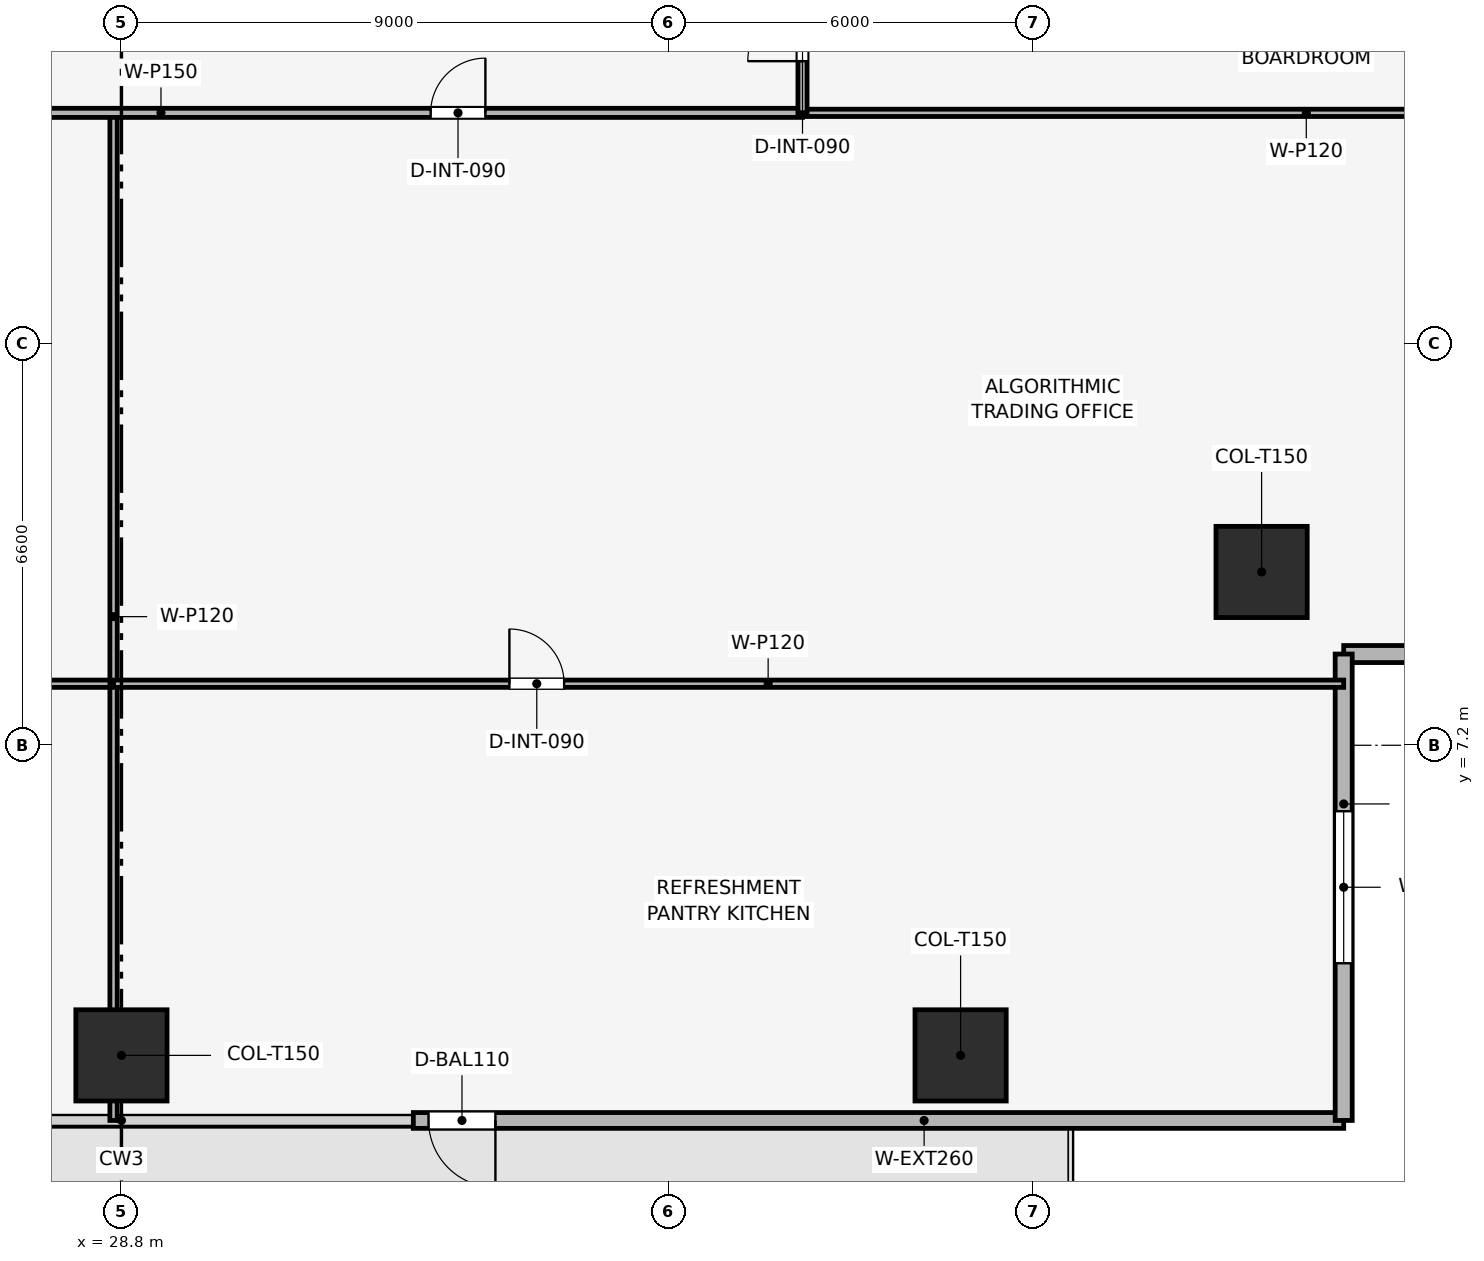
"""IFC4 building model, lengths in metres.
Left out: names, types, materials, properties, quantities, classifications, styles, units other than length and angle.
Written with IfcOpenShell. Run it as: python <this file> out.ifc"""

import sys

from ifc_helpers import new_model, si_unit, direction, frame, frame_2d, origin, origin_2d, place, context, subcontext, project, spatial, rectangle, extrude, element, fill, save


model = new_model("IFC4")
c1 = context("Model", 3, precision=1e-05, world=origin(), true_north=direction((0.0, 1.0)))
c2 = subcontext(c1, "Body", "Model", "MODEL_VIEW")
j1 = project(units=[si_unit("LENGTHUNIT", "METRE"), si_unit("PLANEANGLEUNIT", "RADIAN")], contexts=[c1])
p1 = place(None, origin())
s1 = spatial("IfcSite", under=j1, at=p1, CompositionType="ELEMENT")
p2 = place(p1, origin())
s2 = spatial("IfcBuilding", under=s1, at=p2, CompositionType="ELEMENT")
p3 = place(p2, frame((0.0, 0.0, 61.2)))
s3 = spatial("IfcBuildingStorey", under=s2, at=p3, CompositionType="ELEMENT", Elevation=61.2)
for number, where, z_axis, x_axis in (
    (1, (28.8, 2.1, 0.003), (0.0, 0.0, 1.0), (1.0, 0.0, 0.0)),
    (2, (42.6, 2.1, 0.003), (0.0, 0.0, 1.0), (1.0, 0.0, 0.0)),
    (3, (47.55, 10.05, 0.003), (0.0, 0.0, 1.0), (1.0, 0.0, 0.0)),
):
    element("IfcColumn", number, at=place(p3, frame(where, z_axis=z_axis, x_axis=x_axis)), inside=s3, PredefinedType="COLUMN", context=c2, shape_type="SweptSolid", body=[
        extrude(rectangle(XDim=1.5, YDim=1.5, at=origin_2d()), origin(), (0.0, 0.0, 1.0), 3.644),
    ])
p4 = place(p3, frame((48.9, 1.03, 0.0), z_axis=(0.0, 0.0, 1.0), x_axis=(-1.0, 0.0, 0.0)))
e4 = element("IfcWall", 4, at=p4, inside=s3, PredefinedType="SOLIDWALL", context=c2, shape_type="SweptSolid", body=[
    extrude(rectangle(XDim=15.3, YDim=0.26, at=frame_2d((7.65, 0.0))), origin(), (0.0, 0.0, 1.0), 3.65),
])
p5 = place(p4, frame((13.95, 0.0, 0.0)))
e5 = element("IfcOpeningElement", 5, at=p5, cuts=e4, PredefinedType="OPENING", context=c2, shape_type="SweptSolid", body=[
    extrude(rectangle(XDim=1.1, YDim=2.2, at=frame_2d((0.55, 1.1))), frame((0.0, 0.14, 0.0), z_axis=(0.0, -1.0, 0.0), x_axis=(1.0, 0.0, 0.0)), (0.0, 0.0, 1.0), 0.28),
])
p6 = place(p3, frame((56.57, 8.7, 0.0), z_axis=(0.0, 0.0, 1.0), x_axis=(-1.0, 0.0, 0.0)))
e6 = element("IfcWall", 6, at=p6, inside=s3, PredefinedType="SOLIDWALL", context=c2, shape_type="SweptSolid", body=[
    extrude(rectangle(XDim=7.67, YDim=0.28, at=frame_2d((3.835, 0.0))), origin(), (0.0, 0.0, 1.0), 3.65),
])
p7 = place(p6, frame((2.585, 0.0, 0.9)))
e7 = element("IfcOpeningElement", 7, at=p7, cuts=e6, PredefinedType="OPENING", context=c2, shape_type="SweptSolid", body=[
    extrude(rectangle(XDim=2.5, YDim=1.9, at=frame_2d((1.25, 0.95))), frame((0.0, 0.15, 0.0), z_axis=(0.0, -1.0, 0.0), x_axis=(1.0, 0.0, 0.0)), (0.0, 0.0, 1.0), 0.3),
])
p8 = place(p3, frame((48.9, 8.7, 0.0), z_axis=(0.0, 0.0, 1.0), x_axis=(0.0, -1.0, 0.0)))
e8 = element("IfcWall", 8, at=p8, inside=s3, PredefinedType="SOLIDWALL", context=c2, shape_type="SweptSolid", body=[
    extrude(rectangle(XDim=7.67, YDim=0.28, at=frame_2d((3.835, 0.0))), origin(), (0.0, 0.0, 1.0), 3.65),
])
p9 = place(p8, frame((2.585, 0.0, 0.9)))
e9 = element("IfcOpeningElement", 9, at=p9, cuts=e8, PredefinedType="OPENING", context=c2, shape_type="SweptSolid", body=[
    extrude(rectangle(XDim=2.5, YDim=1.9, at=frame_2d((1.25, 0.95))), frame((0.0, 0.15, 0.0), z_axis=(0.0, -1.0, 0.0), x_axis=(1.0, 0.0, 0.0)), (0.0, 0.0, 1.0), 0.3),
])
p10 = place(p3, frame((19.939, 8.212, 0.0), z_axis=(0.0, 0.0, 1.0), x_axis=(1.0, 0.0, 0.0)))
e10 = element("IfcWall", 10, at=p10, inside=s3, PredefinedType="PARTITIONING", context=c2, shape_type="SweptSolid", body=[
    extrude(rectangle(XDim=8.731, YDim=0.12, at=frame_2d((4.365, 0.0))), origin(), (0.0, 0.0, 1.0), 3.085),
])
p11 = place(p10, frame((1.439, 0.0, 0.0)))
e11 = element("IfcOpeningElement", 11, at=p11, cuts=e10, PredefinedType="OPENING", context=c2, shape_type="SweptSolid", body=[
    extrude(rectangle(XDim=0.9, YDim=2.1, at=frame_2d((0.45, 1.05))), frame((0.0, 0.07, 0.0), z_axis=(0.0, -1.0, 0.0), x_axis=(1.0, 0.0, 0.0)), (0.0, 0.0, 1.0), 0.14),
])
p12 = place(p3, frame((28.67, 1.03, 0.0), z_axis=(0.0, 0.0, 1.0), x_axis=(0.0, 1.0, 0.0)))
e12 = element("IfcWall", 12, at=p12, inside=s3, PredefinedType="PARTITIONING", context=c2, shape_type="SweptSolid", body=[
    extrude(rectangle(XDim=16.57, YDim=0.12, at=frame_2d((8.285, 0.0))), origin(), (0.0, 0.0, 1.0), 3.085),
])
p13 = place(p3, frame((28.67, 8.212, 0.0), z_axis=(0.0, 0.0, 1.0), x_axis=(1.0, 0.0, 0.0)))
e13 = element("IfcWall", 13, at=p13, inside=s3, PredefinedType="PARTITIONING", context=c2, shape_type="SweptSolid", body=[
    extrude(rectangle(XDim=20.23, YDim=0.12, at=frame_2d((10.115, 0.0))), origin(), (0.0, 0.0, 1.0), 2.935),
])
p14 = place(p13, frame((6.51, 0.0, 0.0)))
e14 = element("IfcOpeningElement", 14, at=p14, cuts=e13, PredefinedType="OPENING", context=c2, shape_type="SweptSolid", body=[
    extrude(rectangle(XDim=0.9, YDim=2.1, at=frame_2d((0.45, 1.05))), frame((0.0, 0.07, 0.0), z_axis=(0.0, -1.0, 0.0), x_axis=(1.0, 0.0, 0.0)), (0.0, 0.0, 1.0), 0.14),
])
p15 = place(p3, frame((40.0, 17.6, 0.0), z_axis=(0.0, 0.0, 1.0), x_axis=(1.0, 0.0, 0.0)))
e15 = element("IfcWall", 15, at=p15, inside=s3, PredefinedType="PARTITIONING", context=c2, shape_type="SweptSolid", body=[
    extrude(rectangle(XDim=16.57, YDim=0.12, at=frame_2d((8.285, 0.0))), origin(), (0.0, 0.0, 1.0), 2.935),
])
p16 = place(p3, frame((17.6, 17.6, 0.0), z_axis=(0.0, 0.0, 1.0), x_axis=(1.0, 0.0, 0.0)))
e16 = element("IfcWall", 16, at=p16, inside=s3, PredefinedType="PARTITIONING", context=c2, shape_type="SweptSolid", body=[
    extrude(rectangle(XDim=22.4, YDim=0.15, at=frame_2d((11.2, 0.0))), origin(), (0.0, 0.0, 1.0), 3.085),
])
p17 = place(p16, frame((0.72, 0.0, 0.0)))
e17 = element("IfcOpeningElement", 17, at=p17, cuts=e16, PredefinedType="OPENING", context=c2, shape_type="SweptSolid", body=[
    extrude(rectangle(XDim=0.9, YDim=2.1, at=frame_2d((0.45, 1.05))), frame((0.0, 0.085, 0.0), z_axis=(0.0, -1.0, 0.0), x_axis=(1.0, 0.0, 0.0)), (0.0, 0.0, 1.0), 0.17),
])
p18 = place(p16, frame((6.255, 0.0, 0.0)))
e18 = element("IfcOpeningElement", 18, at=p18, cuts=e16, PredefinedType="OPENING", context=c2, shape_type="SweptSolid", body=[
    extrude(rectangle(XDim=0.9, YDim=2.1, at=frame_2d((0.45, 1.05))), frame((0.0, 0.085, 0.0), z_axis=(0.0, -1.0, 0.0), x_axis=(1.0, 0.0, 0.0)), (0.0, 0.0, 1.0), 0.17),
])
p19 = place(p16, frame((16.285, 0.0, 0.0)))
e19 = element("IfcOpeningElement", 19, at=p19, cuts=e16, PredefinedType="OPENING", context=c2, shape_type="SweptSolid", body=[
    extrude(rectangle(XDim=0.9, YDim=2.1, at=frame_2d((0.45, 1.05))), frame((0.0, 0.085, 0.0), z_axis=(0.0, -1.0, 0.0), x_axis=(1.0, 0.0, 0.0)), (0.0, 0.0, 1.0), 0.17),
])
p20 = place(p3, frame((40.0, 17.6, 0.0), z_axis=(0.0, 0.0, 1.0), x_axis=(0.0, 1.0, 0.0)))
e20 = element("IfcWall", 20, at=p20, inside=s3, PredefinedType="PARTITIONING", context=c2, shape_type="SweptSolid", body=[
    extrude(rectangle(XDim=22.4, YDim=0.15, at=frame_2d((11.2, 0.0))), origin(), (0.0, 0.0, 1.0), 3.085),
])
p21 = place(p20, frame((0.85, 0.0, 0.0)))
e21 = element("IfcOpeningElement", 21, at=p21, cuts=e20, PredefinedType="OPENING", context=c2, shape_type="SweptSolid", body=[
    extrude(rectangle(XDim=0.9, YDim=2.1, at=frame_2d((0.45, 1.05))), frame((0.0, 0.085, 0.0), z_axis=(0.0, -1.0, 0.0), x_axis=(1.0, 0.0, 0.0)), (0.0, 0.0, 1.0), 0.17),
])
p22 = place(p20, frame((3.55, 0.0, 0.0)))
e22 = element("IfcOpeningElement", 22, at=p22, cuts=e20, PredefinedType="OPENING", context=c2, shape_type="SweptSolid", body=[
    extrude(rectangle(XDim=0.9, YDim=2.1, at=frame_2d((0.45, 1.05))), frame((0.0, 0.085, 0.0), z_axis=(0.0, -1.0, 0.0), x_axis=(1.0, 0.0, 0.0)), (0.0, 0.0, 1.0), 0.17),
])
p23 = place(p20, frame((6.45, 0.0, 0.0)))
e23 = element("IfcOpeningElement", 23, at=p23, cuts=e20, PredefinedType="OPENING", context=c2, shape_type="SweptSolid", body=[
    extrude(rectangle(XDim=0.9, YDim=2.1, at=frame_2d((0.45, 1.05))), frame((0.0, 0.085, 0.0), z_axis=(0.0, -1.0, 0.0), x_axis=(1.0, 0.0, 0.0)), (0.0, 0.0, 1.0), 0.17),
])
p24 = place(p20, frame((9.2, 0.0, 0.0)))
e24 = element("IfcOpeningElement", 24, at=p24, cuts=e20, PredefinedType="OPENING", context=c2, shape_type="SweptSolid", body=[
    extrude(rectangle(XDim=0.95, YDim=2.1, at=frame_2d((0.475, 1.05))), frame((0.0, 0.085, 0.0), z_axis=(0.0, -1.0, 0.0), x_axis=(1.0, 0.0, 0.0)), (0.0, 0.0, 1.0), 0.17),
])
p25 = place(p20, frame((16.25, 0.0, 0.0)))
e25 = element("IfcOpeningElement", 25, at=p25, cuts=e20, PredefinedType="OPENING", context=c2, shape_type="SweptSolid", body=[
    extrude(rectangle(XDim=0.9, YDim=2.1, at=frame_2d((0.45, 1.05))), frame((0.0, 0.085, 0.0), z_axis=(0.0, -1.0, 0.0), x_axis=(1.0, 0.0, 0.0)), (0.0, 0.0, 1.0), 0.17),
])
p26 = place(p5, origin())
e26 = element("IfcDoor", 26, at=p26, inside=s3, OperationType="SINGLE_SWING_LEFT", PredefinedType="DOOR", context=c2, shape_type="SweptSolid", body=[
    extrude(rectangle(XDim=1.1, YDim=2.2, at=frame_2d((0.55, 1.1))), frame((0.0, 0.025, 0.0), z_axis=(0.0, -1.0, 0.0), x_axis=(1.0, 0.0, 0.0)), (0.0, 0.0, 1.0), 0.05),
])
fill(e5, e26)
p27 = place(p9, origin())
e27 = element("IfcWindow", 27, at=p27, inside=s3, PartitioningType="SINGLE_PANEL", PredefinedType="WINDOW", context=c2, shape_type="SweptSolid", body=[
    extrude(rectangle(XDim=2.5, YDim=1.9, at=frame_2d((1.25, 0.95))), frame((0.0, 0.03, 0.0), z_axis=(0.0, -1.0, 0.0), x_axis=(1.0, 0.0, 0.0)), (0.0, 0.0, 1.0), 0.06),
])
fill(e9, e27)
p28 = place(p14, origin())
e28 = element("IfcDoor", 28, at=p28, inside=s3, OperationType="SINGLE_SWING_LEFT", PredefinedType="DOOR", context=c2, shape_type="SweptSolid", body=[
    extrude(rectangle(XDim=0.9, YDim=2.1, at=frame_2d((0.45, 1.05))), frame((0.0, 0.025, 0.0), z_axis=(0.0, -1.0, 0.0), x_axis=(1.0, 0.0, 0.0)), (0.0, 0.0, 1.0), 0.05),
])
fill(e14, e28)
p29 = place(p19, origin())
e29 = element("IfcDoor", 29, at=p29, inside=s3, OperationType="SINGLE_SWING_RIGHT", PredefinedType="DOOR", context=c2, shape_type="SweptSolid", body=[
    extrude(rectangle(XDim=0.9, YDim=2.1, at=frame_2d((0.45, 1.05))), frame((0.0, 0.025, 0.0), z_axis=(0.0, -1.0, 0.0), x_axis=(1.0, 0.0, 0.0)), (0.0, 0.0, 1.0), 0.05),
])
fill(e19, e29)
p30 = place(p21, origin())
e30 = element("IfcDoor", 30, at=p30, inside=s3, OperationType="SINGLE_SWING_LEFT", PredefinedType="DOOR", context=c2, shape_type="SweptSolid", body=[
    extrude(rectangle(XDim=0.9, YDim=2.1, at=frame_2d((0.45, 1.05))), frame((0.0, 0.025, 0.0), z_axis=(0.0, -1.0, 0.0), x_axis=(1.0, 0.0, 0.0)), (0.0, 0.0, 1.0), 0.05),
])
fill(e21, e30)
save(model, sys.argv[1])
